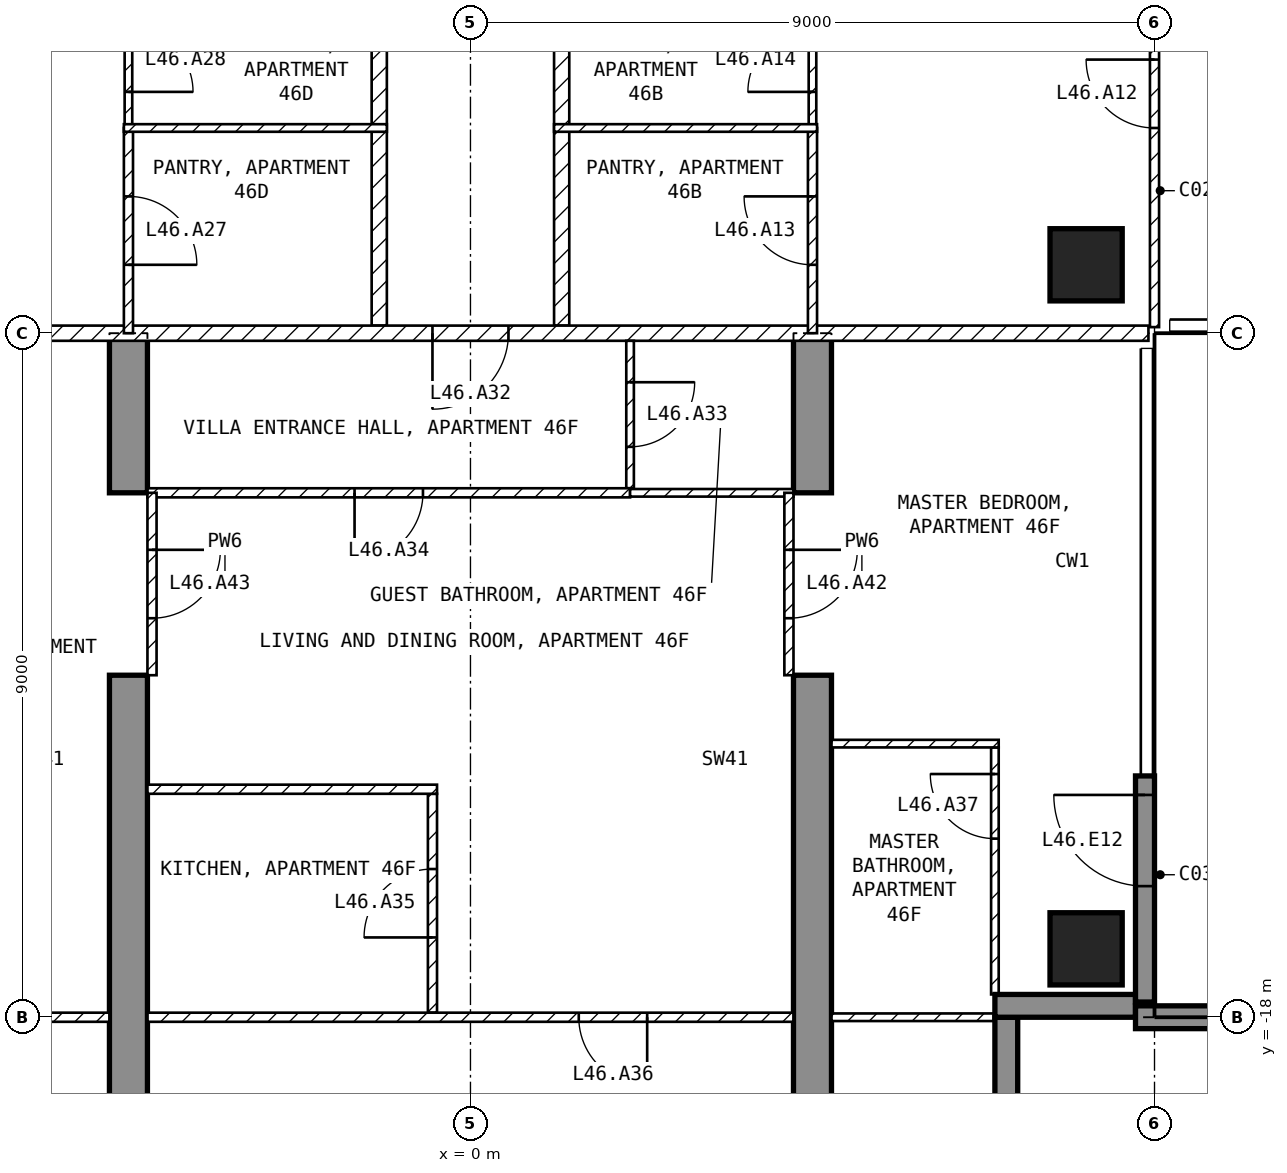
"""IFC4 building model, lengths in metres.
Left out: names, types, materials, properties, quantities, classifications, styles, units other than length and angle.
Written with IfcOpenShell. Run it as: python <this file> out.ifc"""

import sys

from ifc_helpers import new_model, si_unit, direction, frame, frame_2d, origin, origin_2d, place, context, subcontext, project, spatial, polyline, rectangle, outline, extrude, element, fill, save


model = new_model("IFC4")
c1 = context("Model", 3, precision=1e-05, world=origin(), true_north=direction((0.0, 1.0)))
c2 = subcontext(c1, "Body", "Model", "MODEL_VIEW")
j1 = project(units=[si_unit("LENGTHUNIT", "METRE"), si_unit("PLANEANGLEUNIT", "RADIAN")], contexts=[c1])
p1 = place(None, origin())
s1 = spatial("IfcSite", under=j1, at=p1, CompositionType="ELEMENT")
p2 = place(p1, origin())
s2 = spatial("IfcBuilding", under=s1, at=p2, CompositionType="ELEMENT")
p3 = place(p2, frame((0.0, 0.0, 187.6)))
s3 = spatial("IfcBuildingStorey", under=s2, at=p3, CompositionType="ELEMENT", Elevation=187.6)
for number, where, z_axis, x_axis in (
    (1, (8.1, -17.1, -0.25), (0.0, 0.0, 1.0), (1.0, 0.0, 0.0)),
    (2, (8.1, -8.1, -0.25), (0.0, 0.0, 1.0), (1.0, 0.0, 0.0)),
):
    element("IfcColumn", number, at=place(p3, frame(where, z_axis=z_axis, x_axis=x_axis)), inside=s3, PredefinedType="COLUMN", context=c2, shape_type="SweptSolid", body=[
        extrude(rectangle(XDim=0.95, YDim=0.95, at=origin_2d()), origin(), (0.0, 0.0, 1.0), 3.5),
    ])
for number, where, z_axis, x_axis in (
    (3, (-4.75, -20.225, -0.25), (1.0, 0.0, 0.0), (0.0, 1.0, 0.0)),
    (4, (4.25, -20.225, -0.25), (1.0, 0.0, 0.0), (0.0, 1.0, 0.0)),
):
    element("IfcWall", number, at=place(p3, frame(where, z_axis=z_axis, x_axis=x_axis)), inside=s3, PredefinedType="SHEAR", context=c2, shape_type="SweptSolid", body=[
        extrude(outline(polyline([(0.0, 0.0), (6.725, 0.0), (6.725, 2.65), (9.125, 2.65), (9.125, 0.0), (11.225, 0.0), (11.225, 3.5), (0.0, 3.5), (0.0, 0.0)])), origin(), (0.0, 0.0, 1.0), 0.5),
    ])
p4 = place(p3, frame((8.875, -17.8, 0.0), z_axis=(0.0, 0.0, 1.0), x_axis=(0.0, 1.0, 0.0)))
e5 = element("IfcWall", 5, at=p4, inside=s3, PredefinedType="SOLIDWALL", context=c2, shape_type="SweptSolid", body=[
    extrude(rectangle(XDim=2.975, YDim=0.25, at=frame_2d((1.488, 0.0))), origin(), (0.0, 0.0, 1.0), 3.25),
])
p5 = place(p4, frame((1.525, 0.0, 0.0)))
e6 = element("IfcOpeningElement", 6, at=p5, cuts=e5, PredefinedType="OPENING", context=c2, shape_type="SweptSolid", body=[
    extrude(rectangle(XDim=1.2, YDim=2.4, at=frame_2d((0.6, 1.2))), frame((0.0, 0.135, 0.0), z_axis=(0.0, -1.0, 0.0), x_axis=(1.0, 0.0, 0.0)), (0.0, 0.0, 1.0), 0.27),
])
p6 = place(p3, frame((7.05, -19.8, 0.0), z_axis=(0.0, 0.0, 1.0), x_axis=(0.0, 1.0, 0.0)))
e7 = element("IfcWall", 7, at=p6, inside=s3, PredefinedType="SOLIDWALL", context=c2, shape_type="SweptSolid", body=[
    extrude(rectangle(XDim=1.8, YDim=0.3, at=frame_2d((0.9, 0.0))), origin(), (0.0, 0.0, 1.0), 3.25),
])
p7 = place(p3, frame((6.9, -17.85, 0.0), z_axis=(0.0, 0.0, 1.0), x_axis=(1.0, 0.0, 0.0)))
e8 = element("IfcWall", 8, at=p7, inside=s3, PredefinedType="SOLIDWALL", context=c2, shape_type="SweptSolid", body=[
    extrude(rectangle(XDim=1.85, YDim=0.3, at=frame_2d((0.925, 0.0))), origin(), (0.0, 0.0, 1.0), 3.25),
])
p8 = place(p3, frame((8.75, -18.0, 0.0), z_axis=(0.0, 0.0, 1.0), x_axis=(1.0, 0.0, 0.0)))
e9 = element("IfcWall", 9, at=p8, inside=s3, PredefinedType="SOLIDWALL", context=c2, shape_type="SweptSolid", body=[
    extrude(rectangle(XDim=2.95, YDim=0.3, at=frame_2d((1.475, 0.0))), origin(), (0.0, 0.0, 1.0), 3.25),
])
for number, where, z_axis, x_axis in (
    (10, (1.2, -4.6, 0.0), (0.0, 0.0, 1.0), (0.0, -1.0, 0.0)),
    (11, (-1.2, -8.9, 0.0), (0.0, 0.0, 1.0), (0.0, 1.0, 0.0)),
):
    element("IfcWall", number, at=place(p3, frame(where, z_axis=z_axis, x_axis=x_axis)), inside=s3, PredefinedType="PARTITIONING", context=c2, shape_type="SweptSolid", body=[
        extrude(rectangle(XDim=4.3, YDim=0.2, at=frame_2d((2.15, 0.0))), origin(), (0.0, 0.0, 1.0), 3.25),
    ])
p9 = place(p3, frame((8.92, -9.0, 0.0), z_axis=(0.0, 0.0, 1.0), x_axis=(-1.0, 0.0, 0.0)))
e12 = element("IfcWall", 12, at=p9, inside=s3, PredefinedType="PARTITIONING", context=c2, shape_type="SweptSolid", body=[
    extrude(rectangle(XDim=17.84, YDim=0.2, at=frame_2d((8.92, 0.0))), origin(), (0.0, 0.0, 1.0), 3.25),
])
p10 = place(p9, frame((8.42, 0.0, 0.0)))
e13 = element("IfcOpeningElement", 13, at=p10, cuts=e12, PredefinedType="OPENING", context=c2, shape_type="SweptSolid", body=[
    extrude(rectangle(XDim=1.0, YDim=2.1, at=frame_2d((0.5, 1.05))), frame((0.0, 0.11, 0.0), z_axis=(0.0, -1.0, 0.0), x_axis=(1.0, 0.0, 0.0)), (0.0, 0.0, 1.0), 0.22),
])
p11 = place(p3, frame((9.0, -8.92, 0.0), z_axis=(0.0, 0.0, 1.0), x_axis=(0.0, 1.0, 0.0)))
e14 = element("IfcWall", 14, at=p11, inside=s3, PredefinedType="PARTITIONING", context=c2, shape_type="SweptSolid", body=[
    extrude(rectangle(XDim=7.62, YDim=0.12, at=frame_2d((3.81, 0.0))), origin(), (0.0, 0.0, 1.0), 3.25),
])
p12 = place(p11, frame((2.62, 0.0, 0.0)))
e15 = element("IfcOpeningElement", 15, at=p12, cuts=e14, PredefinedType="OPENING", context=c2, shape_type="SweptSolid", body=[
    extrude(rectangle(XDim=0.9, YDim=2.1, at=frame_2d((0.45, 1.05))), frame((0.0, 0.07, 0.0), z_axis=(0.0, -1.0, 0.0), x_axis=(1.0, 0.0, 0.0)), (0.0, 0.0, 1.0), 0.14),
])
p13 = place(p3, frame((4.5, -6.3, 0.0), z_axis=(0.0, 0.0, 1.0), x_axis=(0.0, 1.0, 0.0)))
e16 = element("IfcWall", 16, at=p13, inside=s3, PredefinedType="PARTITIONING", context=c2, shape_type="SweptSolid", body=[
    extrude(rectangle(XDim=1.8, YDim=0.1, at=frame_2d((0.9, 0.0))), origin(), (0.0, 0.0, 1.0), 3.25),
])
p14 = place(p13, frame((0.475, 0.0, 0.0)))
e17 = element("IfcOpeningElement", 17, at=p14, cuts=e16, PredefinedType="OPENING", context=c2, shape_type="SweptSolid", body=[
    extrude(rectangle(XDim=0.85, YDim=2.1, at=frame_2d((0.425, 1.05))), frame((0.0, 0.06, 0.0), z_axis=(0.0, -1.0, 0.0), x_axis=(1.0, 0.0, 0.0)), (0.0, 0.0, 1.0), 0.12),
])
p15 = place(p3, frame((4.5, -9.0, 0.0), z_axis=(0.0, 0.0, 1.0), x_axis=(0.0, 1.0, 0.0)))
e18 = element("IfcWall", 18, at=p15, inside=s3, PredefinedType="PARTITIONING", context=c2, shape_type="SweptSolid", body=[
    extrude(rectangle(XDim=2.7, YDim=0.12, at=frame_2d((1.35, 0.0))), origin(), (0.0, 0.0, 1.0), 3.25),
])
p16 = place(p15, frame((0.9, 0.0, 0.0)))
e19 = element("IfcOpeningElement", 19, at=p16, cuts=e18, PredefinedType="OPENING", context=c2, shape_type="SweptSolid", body=[
    extrude(rectangle(XDim=0.9, YDim=2.1, at=frame_2d((0.45, 1.05))), frame((0.0, 0.07, 0.0), z_axis=(0.0, -1.0, 0.0), x_axis=(1.0, 0.0, 0.0)), (0.0, 0.0, 1.0), 0.14),
])
p17 = place(p3, frame((4.56, -6.3, 0.0), z_axis=(0.0, 0.0, 1.0), x_axis=(-1.0, 0.0, 0.0)))
e20 = element("IfcWall", 20, at=p17, inside=s3, PredefinedType="PARTITIONING", context=c2, shape_type="SweptSolid", body=[
    extrude(rectangle(XDim=3.46, YDim=0.1, at=frame_2d((1.73, 0.0))), origin(), (0.0, 0.0, 1.0), 3.25),
])
p18 = place(p3, frame((-4.5, -4.5, 0.0), z_axis=(0.0, 0.0, 1.0), x_axis=(0.0, -1.0, 0.0)))
e21 = element("IfcWall", 21, at=p18, inside=s3, PredefinedType="PARTITIONING", context=c2, shape_type="SweptSolid", body=[
    extrude(rectangle(XDim=1.8, YDim=0.1, at=frame_2d((0.9, 0.0))), origin(), (0.0, 0.0, 1.0), 3.25),
])
p19 = place(p18, frame((0.475, 0.0, 0.0)))
e22 = element("IfcOpeningElement", 22, at=p19, cuts=e21, PredefinedType="OPENING", context=c2, shape_type="SweptSolid", body=[
    extrude(rectangle(XDim=0.85, YDim=2.1, at=frame_2d((0.425, 1.05))), frame((0.0, 0.06, 0.0), z_axis=(0.0, -1.0, 0.0), x_axis=(1.0, 0.0, 0.0)), (0.0, 0.0, 1.0), 0.12),
])
p20 = place(p3, frame((-4.5, -6.3, 0.0), z_axis=(0.0, 0.0, 1.0), x_axis=(0.0, -1.0, 0.0)))
e23 = element("IfcWall", 23, at=p20, inside=s3, PredefinedType="PARTITIONING", context=c2, shape_type="SweptSolid", body=[
    extrude(rectangle(XDim=2.7, YDim=0.12, at=frame_2d((1.35, 0.0))), origin(), (0.0, 0.0, 1.0), 3.25),
])
p21 = place(p20, frame((0.9, 0.0, 0.0)))
e24 = element("IfcOpeningElement", 24, at=p21, cuts=e23, PredefinedType="OPENING", context=c2, shape_type="SweptSolid", body=[
    extrude(rectangle(XDim=0.9, YDim=2.1, at=frame_2d((0.45, 1.05))), frame((0.0, 0.07, 0.0), z_axis=(0.0, -1.0, 0.0), x_axis=(1.0, 0.0, 0.0)), (0.0, 0.0, 1.0), 0.14),
])
p22 = place(p3, frame((-1.1, -6.3, 0.0), z_axis=(0.0, 0.0, 1.0), x_axis=(-1.0, 0.0, 0.0)))
e25 = element("IfcWall", 25, at=p22, inside=s3, PredefinedType="PARTITIONING", context=c2, shape_type="SweptSolid", body=[
    extrude(rectangle(XDim=3.46, YDim=0.1, at=frame_2d((1.73, 0.0))), origin(), (0.0, 0.0, 1.0), 3.25),
])
p23 = place(p3, frame((2.1, -9.1, 0.0), z_axis=(0.0, 0.0, 1.0), x_axis=(0.0, -1.0, 0.0)))
e26 = element("IfcWall", 26, at=p23, inside=s3, PredefinedType="PARTITIONING", context=c2, shape_type="SweptSolid", body=[
    extrude(rectangle(XDim=1.94, YDim=0.1, at=frame_2d((0.97, 0.0))), origin(), (0.0, 0.0, 1.0), 3.25),
])
p24 = place(p23, frame((0.545, 0.0, 0.0)))
e27 = element("IfcOpeningElement", 27, at=p24, cuts=e26, PredefinedType="OPENING", context=c2, shape_type="SweptSolid", body=[
    extrude(rectangle(XDim=0.85, YDim=2.1, at=frame_2d((0.425, 1.05))), frame((0.0, 0.06, 0.0), z_axis=(0.0, -1.0, 0.0), x_axis=(1.0, 0.0, 0.0)), (0.0, 0.0, 1.0), 0.12),
])
p25 = place(p3, frame((2.1, -11.1, 0.0), z_axis=(0.0, 0.0, 1.0), x_axis=(-1.0, 0.0, 0.0)))
e28 = element("IfcWall", 28, at=p25, inside=s3, PredefinedType="PARTITIONING", context=c2, shape_type="SweptSolid", body=[
    extrude(rectangle(XDim=6.35, YDim=0.12, at=frame_2d((3.175, 0.0))), origin(), (0.0, 0.0, 1.0), 3.25),
])
p26 = place(p25, frame((2.725, 0.0, 0.0)))
e29 = element("IfcOpeningElement", 29, at=p26, cuts=e28, PredefinedType="OPENING", context=c2, shape_type="SweptSolid", body=[
    extrude(rectangle(XDim=0.9, YDim=2.1, at=frame_2d((0.45, 1.05))), frame((0.0, 0.07, 0.0), z_axis=(0.0, -1.0, 0.0), x_axis=(1.0, 0.0, 0.0)), (0.0, 0.0, 1.0), 0.14),
])
p27 = place(p3, frame((4.25, -11.1, 0.0), z_axis=(0.0, 0.0, 1.0), x_axis=(-1.0, 0.0, 0.0)))
e30 = element("IfcWall", 30, at=p27, inside=s3, PredefinedType="PARTITIONING", context=c2, shape_type="SweptSolid", body=[
    extrude(rectangle(XDim=2.15, YDim=0.1, at=frame_2d((1.075, 0.0))), origin(), (0.0, 0.0, 1.0), 3.25),
])
p28 = place(p3, frame((-0.5, -17.94, 0.0), z_axis=(0.0, 0.0, 1.0), x_axis=(0.0, 1.0, 0.0)))
e31 = element("IfcWall", 31, at=p28, inside=s3, PredefinedType="PARTITIONING", context=c2, shape_type="SweptSolid", body=[
    extrude(rectangle(XDim=2.88, YDim=0.12, at=frame_2d((1.44, 0.0))), origin(), (0.0, 0.0, 1.0), 3.25),
])
p29 = place(p28, frame((0.99, 0.0, 0.0)))
e32 = element("IfcOpeningElement", 32, at=p29, cuts=e31, PredefinedType="OPENING", context=c2, shape_type="SweptSolid", body=[
    extrude(rectangle(XDim=0.9, YDim=2.1, at=frame_2d((0.45, 1.05))), frame((0.0, 0.07, 0.0), z_axis=(0.0, -1.0, 0.0), x_axis=(1.0, 0.0, 0.0)), (0.0, 0.0, 1.0), 0.14),
])
p30 = place(p3, frame((-0.44, -15.0, 0.0), z_axis=(0.0, 0.0, 1.0), x_axis=(-1.0, 0.0, 0.0)))
e33 = element("IfcWall", 33, at=p30, inside=s3, PredefinedType="PARTITIONING", context=c2, shape_type="SweptSolid", body=[
    extrude(rectangle(XDim=3.81, YDim=0.12, at=frame_2d((1.905, 0.0))), origin(), (0.0, 0.0, 1.0), 3.25),
])
p31 = place(p3, frame((4.25, -18.0, 0.0), z_axis=(0.0, 0.0, 1.0), x_axis=(-1.0, 0.0, 0.0)))
e34 = element("IfcWall", 34, at=p31, inside=s3, PredefinedType="PARTITIONING", context=c2, shape_type="SweptSolid", body=[
    extrude(rectangle(XDim=8.5, YDim=0.12, at=frame_2d((4.25, 0.0))), origin(), (0.0, 0.0, 1.0), 3.25),
])
p32 = place(p31, frame((1.925, 0.0, 0.0)))
e35 = element("IfcOpeningElement", 35, at=p32, cuts=e34, PredefinedType="OPENING", context=c2, shape_type="SweptSolid", body=[
    extrude(rectangle(XDim=0.9, YDim=2.1, at=frame_2d((0.45, 1.05))), frame((0.0, 0.07, 0.0), z_axis=(0.0, -1.0, 0.0), x_axis=(1.0, 0.0, 0.0)), (0.0, 0.0, 1.0), 0.14),
])
p33 = place(p3, frame((6.9, -17.7, 0.0), z_axis=(0.0, 0.0, 1.0), x_axis=(0.0, 1.0, 0.0)))
e36 = element("IfcWall", 36, at=p33, inside=s3, PredefinedType="PARTITIONING", context=c2, shape_type="SweptSolid", body=[
    extrude(rectangle(XDim=3.25, YDim=0.1, at=frame_2d((1.625, 0.0))), origin(), (0.0, 0.0, 1.0), 3.25),
])
p34 = place(p33, frame((2.05, 0.0, 0.0)))
e37 = element("IfcOpeningElement", 37, at=p34, cuts=e36, PredefinedType="OPENING", context=c2, shape_type="SweptSolid", body=[
    extrude(rectangle(XDim=0.85, YDim=2.1, at=frame_2d((0.425, 1.05))), frame((0.0, 0.06, 0.0), z_axis=(0.0, -1.0, 0.0), x_axis=(1.0, 0.0, 0.0)), (0.0, 0.0, 1.0), 0.12),
])
p35 = place(p3, frame((6.95, -14.4, 0.0), z_axis=(0.0, 0.0, 1.0), x_axis=(-1.0, 0.0, 0.0)))
e38 = element("IfcWall", 38, at=p35, inside=s3, PredefinedType="PARTITIONING", context=c2, shape_type="SweptSolid", body=[
    extrude(rectangle(XDim=2.2, YDim=0.1, at=frame_2d((1.1, 0.0))), origin(), (0.0, 0.0, 1.0), 3.25),
])
p36 = place(p3, frame((7.12, -18.0, 0.0), z_axis=(0.0, 0.0, 1.0), x_axis=(-1.0, 0.0, 0.0)))
e39 = element("IfcWall", 39, at=p36, inside=s3, PredefinedType="PARTITIONING", context=c2, shape_type="SweptSolid", body=[
    extrude(rectangle(XDim=2.37, YDim=0.1, at=frame_2d((1.185, 0.0))), origin(), (0.0, 0.0, 1.0), 3.25),
])
p37 = place(p3, frame((-4.75, -18.0, 0.0), z_axis=(0.0, 0.0, 1.0), x_axis=(-1.0, 0.0, 0.0)))
e40 = element("IfcWall", 40, at=p37, inside=s3, PredefinedType="PARTITIONING", context=c2, shape_type="SweptSolid", body=[
    extrude(rectangle(XDim=2.37, YDim=0.12, at=frame_2d((1.185, 0.0))), origin(), (0.0, 0.0, 1.0), 3.25),
])
p38 = place(p3, frame((4.19, -11.1, 0.0), z_axis=(0.0, 0.0, 1.0), x_axis=(0.0, -1.0, 0.0)))
e41 = element("IfcWall", 41, at=p38, inside=s3, PredefinedType="PARTITIONING", context=c2, shape_type="SweptSolid", body=[
    extrude(rectangle(XDim=2.4, YDim=0.12, at=frame_2d((1.2, 0.0))), origin(), (0.0, 0.0, 1.0), 2.4),
])
p39 = place(p38, frame((0.75, 0.0, 0.0)))
e42 = element("IfcOpeningElement", 42, at=p39, cuts=e41, PredefinedType="OPENING", context=c2, shape_type="SweptSolid", body=[
    extrude(rectangle(XDim=0.9, YDim=2.1, at=frame_2d((0.45, 1.05))), frame((0.0, 0.07, 0.0), z_axis=(0.0, -1.0, 0.0), x_axis=(1.0, 0.0, 0.0)), (0.0, 0.0, 1.0), 0.14),
])
p40 = place(p3, frame((-4.19, -11.1, 0.0), z_axis=(0.0, 0.0, 1.0), x_axis=(0.0, -1.0, 0.0)))
e43 = element("IfcWall", 43, at=p40, inside=s3, PredefinedType="PARTITIONING", context=c2, shape_type="SweptSolid", body=[
    extrude(rectangle(XDim=2.4, YDim=0.12, at=frame_2d((1.2, 0.0))), origin(), (0.0, 0.0, 1.0), 2.4),
])
p41 = place(p40, frame((0.75, 0.0, 0.0)))
e44 = element("IfcOpeningElement", 44, at=p41, cuts=e43, PredefinedType="OPENING", context=c2, shape_type="SweptSolid", body=[
    extrude(rectangle(XDim=0.9, YDim=2.1, at=frame_2d((0.45, 1.05))), frame((0.0, 0.07, 0.0), z_axis=(0.0, -1.0, 0.0), x_axis=(1.0, 0.0, 0.0)), (0.0, 0.0, 1.0), 0.14),
])
p42 = place(p5, origin())
e45 = element("IfcDoor", 45, at=p42, inside=s3, OperationType="SINGLE_SWING_RIGHT", PredefinedType="DOOR", context=c2, shape_type="SweptSolid", body=[
    extrude(rectangle(XDim=1.2, YDim=2.4, at=frame_2d((0.6, 1.2))), frame((0.0, 0.025, 0.0), z_axis=(0.0, -1.0, 0.0), x_axis=(1.0, 0.0, 0.0)), (0.0, 0.0, 1.0), 0.05),
])
fill(e6, e45)
p43 = place(p12, origin())
e46 = element("IfcDoor", 46, at=p43, inside=s3, OperationType="SINGLE_SWING_RIGHT", PredefinedType="DOOR", context=c2, shape_type="SweptSolid", body=[
    extrude(rectangle(XDim=0.9, YDim=2.1, at=frame_2d((0.45, 1.05))), frame((0.0, 0.025, 0.0), z_axis=(0.0, -1.0, 0.0), x_axis=(1.0, 0.0, 0.0)), (0.0, 0.0, 1.0), 0.05),
])
fill(e15, e46)
p44 = place(p16, origin())
e47 = element("IfcDoor", 47, at=p44, inside=s3, OperationType="SINGLE_SWING_RIGHT", PredefinedType="DOOR", context=c2, shape_type="SweptSolid", body=[
    extrude(rectangle(XDim=0.9, YDim=2.1, at=frame_2d((0.45, 1.05))), frame((0.0, 0.025, 0.0), z_axis=(0.0, -1.0, 0.0), x_axis=(1.0, 0.0, 0.0)), (0.0, 0.0, 1.0), 0.05),
])
fill(e19, e47)
p45 = place(p14, origin())
e48 = element("IfcDoor", 48, at=p45, inside=s3, OperationType="SINGLE_SWING_LEFT", PredefinedType="DOOR", context=c2, shape_type="SweptSolid", body=[
    extrude(rectangle(XDim=0.85, YDim=2.1, at=frame_2d((0.425, 1.05))), frame((0.0, 0.025, 0.0), z_axis=(0.0, -1.0, 0.0), x_axis=(1.0, 0.0, 0.0)), (0.0, 0.0, 1.0), 0.05),
])
fill(e17, e48)
p46 = place(p21, origin())
e49 = element("IfcDoor", 49, at=p46, inside=s3, OperationType="SINGLE_SWING_RIGHT", PredefinedType="DOOR", context=c2, shape_type="SweptSolid", body=[
    extrude(rectangle(XDim=0.9, YDim=2.1, at=frame_2d((0.45, 1.05))), frame((0.0, 0.025, 0.0), z_axis=(0.0, -1.0, 0.0), x_axis=(1.0, 0.0, 0.0)), (0.0, 0.0, 1.0), 0.05),
])
fill(e24, e49)
p47 = place(p19, origin())
e50 = element("IfcDoor", 50, at=p47, inside=s3, OperationType="SINGLE_SWING_RIGHT", PredefinedType="DOOR", context=c2, shape_type="SweptSolid", body=[
    extrude(rectangle(XDim=0.85, YDim=2.1, at=frame_2d((0.425, 1.05))), frame((0.0, 0.025, 0.0), z_axis=(0.0, -1.0, 0.0), x_axis=(1.0, 0.0, 0.0)), (0.0, 0.0, 1.0), 0.05),
])
fill(e22, e50)
p48 = place(p10, origin())
e51 = element("IfcDoor", 51, at=p48, inside=s3, OperationType="SINGLE_SWING_RIGHT", PredefinedType="DOOR", context=c2, shape_type="SweptSolid", body=[
    extrude(rectangle(XDim=1.0, YDim=2.1, at=frame_2d((0.5, 1.05))), frame((0.0, 0.025, 0.0), z_axis=(0.0, -1.0, 0.0), x_axis=(1.0, 0.0, 0.0)), (0.0, 0.0, 1.0), 0.05),
])
fill(e13, e51)
p49 = place(p24, origin())
e52 = element("IfcDoor", 52, at=p49, inside=s3, OperationType="SINGLE_SWING_LEFT", PredefinedType="DOOR", context=c2, shape_type="SweptSolid", body=[
    extrude(rectangle(XDim=0.85, YDim=2.1, at=frame_2d((0.425, 1.05))), frame((0.0, 0.025, 0.0), z_axis=(0.0, -1.0, 0.0), x_axis=(1.0, 0.0, 0.0)), (0.0, 0.0, 1.0), 0.05),
])
fill(e27, e52)
p50 = place(p26, origin())
e53 = element("IfcDoor", 53, at=p50, inside=s3, OperationType="SINGLE_SWING_RIGHT", PredefinedType="DOOR", context=c2, shape_type="SweptSolid", body=[
    extrude(rectangle(XDim=0.9, YDim=2.1, at=frame_2d((0.45, 1.05))), frame((0.0, 0.025, 0.0), z_axis=(0.0, -1.0, 0.0), x_axis=(1.0, 0.0, 0.0)), (0.0, 0.0, 1.0), 0.05),
])
fill(e29, e53)
p51 = place(p29, origin())
e54 = element("IfcDoor", 54, at=p51, inside=s3, OperationType="SINGLE_SWING_LEFT", PredefinedType="DOOR", context=c2, shape_type="SweptSolid", body=[
    extrude(rectangle(XDim=0.9, YDim=2.1, at=frame_2d((0.45, 1.05))), frame((0.0, 0.025, 0.0), z_axis=(0.0, -1.0, 0.0), x_axis=(1.0, 0.0, 0.0)), (0.0, 0.0, 1.0), 0.05),
])
fill(e32, e54)
p52 = place(p32, origin())
e55 = element("IfcDoor", 55, at=p52, inside=s3, OperationType="SINGLE_SWING_LEFT", PredefinedType="DOOR", context=c2, shape_type="SweptSolid", body=[
    extrude(rectangle(XDim=0.9, YDim=2.1, at=frame_2d((0.45, 1.05))), frame((0.0, 0.025, 0.0), z_axis=(0.0, -1.0, 0.0), x_axis=(1.0, 0.0, 0.0)), (0.0, 0.0, 1.0), 0.05),
])
fill(e35, e55)
p53 = place(p34, origin())
e56 = element("IfcDoor", 56, at=p53, inside=s3, OperationType="SINGLE_SWING_RIGHT", PredefinedType="DOOR", context=c2, shape_type="SweptSolid", body=[
    extrude(rectangle(XDim=0.85, YDim=2.1, at=frame_2d((0.425, 1.05))), frame((0.0, 0.025, 0.0), z_axis=(0.0, -1.0, 0.0), x_axis=(1.0, 0.0, 0.0)), (0.0, 0.0, 1.0), 0.05),
])
fill(e37, e56)
p54 = place(p39, origin())
e57 = element("IfcDoor", 57, at=p54, inside=s3, OperationType="SINGLE_SWING_LEFT", PredefinedType="DOOR", context=c2, shape_type="SweptSolid", body=[
    extrude(rectangle(XDim=0.9, YDim=2.1, at=frame_2d((0.45, 1.05))), frame((0.0, 0.025, 0.0), z_axis=(0.0, -1.0, 0.0), x_axis=(1.0, 0.0, 0.0)), (0.0, 0.0, 1.0), 0.05),
])
fill(e42, e57)
p55 = place(p41, origin())
e58 = element("IfcDoor", 58, at=p55, inside=s3, OperationType="SINGLE_SWING_LEFT", PredefinedType="DOOR", context=c2, shape_type="SweptSolid", body=[
    extrude(rectangle(XDim=0.9, YDim=2.1, at=frame_2d((0.45, 1.05))), frame((0.0, 0.025, 0.0), z_axis=(0.0, -1.0, 0.0), x_axis=(1.0, 0.0, 0.0)), (0.0, 0.0, 1.0), 0.05),
])
fill(e44, e58)
save(model, sys.argv[1])
